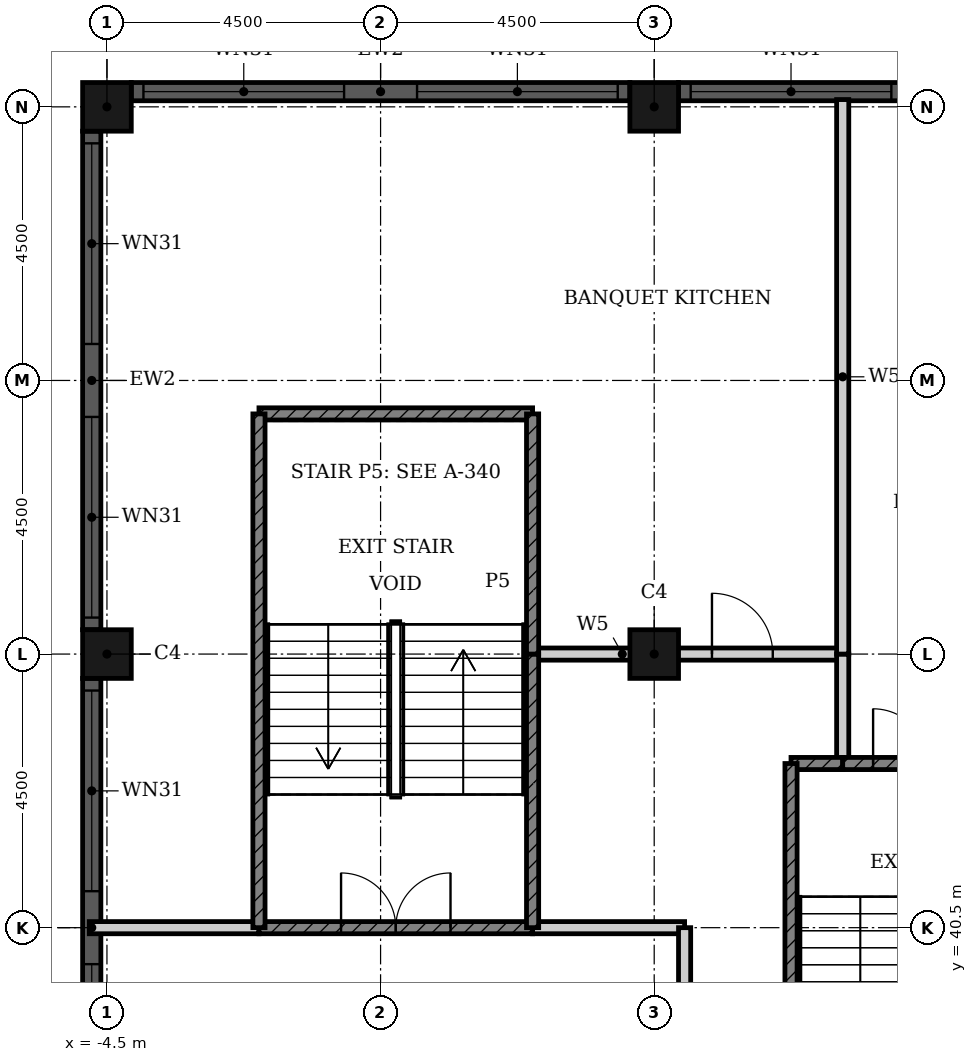
"""IFC4 building model, lengths in metres.
Left out: names, types, materials, properties, quantities, classifications, styles, units other than length and angle.
Written with IfcOpenShell. Run it as: python <this file> out.ifc"""

import sys

from ifc_helpers import new_model, si_unit, direction, frame, frame_2d, origin, origin_2d, place, context, subcontext, project, spatial, rectangle, hollow_rectangle, extrude, element, fill, save


model = new_model("IFC4")
c1 = context("Model", 3, precision=1e-05, world=origin(), true_north=direction((0.0, 1.0)))
c2 = subcontext(c1, "Body", "Model", "MODEL_VIEW")
j1 = project(units=[si_unit("LENGTHUNIT", "METRE"), si_unit("PLANEANGLEUNIT", "RADIAN")], contexts=[c1])
p1 = place(None, origin())
s1 = spatial("IfcSite", under=j1, at=p1, CompositionType="ELEMENT")
p2 = place(p1, origin())
s2 = spatial("IfcBuilding", under=s1, at=p2, CompositionType="ELEMENT")
p3 = place(p2, frame((0.0, 0.0, 17.4)))
s3 = spatial("IfcBuildingStorey", under=s2, at=p3, CompositionType="ELEMENT", Elevation=17.4)
for number, where, z_axis, x_axis in (
    (1, (-4.5, 45.0, 0.0), (0.0, 0.0, 1.0), (1.0, 0.0, 0.0)),
    (2, (-4.5, 54.0, 0.0), (0.0, 0.0, 1.0), (1.0, 0.0, 0.0)),
    (3, (4.5, 54.0, 0.0), (0.0, 0.0, 1.0), (1.0, 0.0, 0.0)),
    (4, (4.5, 45.0, 0.0), (0.0, 0.0, 1.0), (1.0, 0.0, 0.0)),
):
    element("IfcColumn", number, at=place(p3, frame(where, z_axis=z_axis, x_axis=x_axis)), inside=s3, PredefinedType="COLUMN", context=c2, shape_type="SweptSolid", body=[
        extrude(hollow_rectangle(XDim=0.8, YDim=0.8, WallThickness=0.025, at=origin_2d()), origin(), (0.0, 0.0, 1.0), 6.6),
    ])
p4 = place(p3, frame((13.1, 54.25, 0.0), z_axis=(0.0, 0.0, 1.0), x_axis=(-1.0, 0.0, 0.0)))
e5 = element("IfcWall", 5, at=p4, inside=s3, PredefinedType="SOLIDWALL", context=c2, shape_type="SweptSolid", body=[
    extrude(rectangle(XDim=8.2, YDim=0.3, at=frame_2d((4.1, 0.0))), origin(), (0.0, 0.0, 1.0), 6.6),
])
p5 = place(p4, frame((0.2, 0.0, 0.9)))
e6 = element("IfcOpeningElement", 6, at=p5, cuts=e5, PredefinedType="OPENING", context=c2, shape_type="SweptSolid", body=[
    extrude(rectangle(XDim=3.3, YDim=3.6, at=frame_2d((1.65, 1.8))), frame((0.0, 0.16, 0.0), z_axis=(0.0, -1.0, 0.0), x_axis=(1.0, 0.0, 0.0)), (0.0, 0.0, 1.0), 0.32),
])
p6 = place(p4, frame((4.7, 0.0, 0.9)))
e7 = element("IfcOpeningElement", 7, at=p6, cuts=e5, PredefinedType="OPENING", context=c2, shape_type="SweptSolid", body=[
    extrude(rectangle(XDim=3.3, YDim=3.6, at=frame_2d((1.65, 1.8))), frame((0.0, 0.16, 0.0), z_axis=(0.0, -1.0, 0.0), x_axis=(1.0, 0.0, 0.0)), (0.0, 0.0, 1.0), 0.32),
])
p7 = place(p3, frame((4.1, 54.25, 0.0), z_axis=(0.0, 0.0, 1.0), x_axis=(-1.0, 0.0, 0.0)))
e8 = element("IfcWall", 8, at=p7, inside=s3, PredefinedType="SOLIDWALL", context=c2, shape_type="SweptSolid", body=[
    extrude(rectangle(XDim=8.2, YDim=0.3, at=frame_2d((4.1, 0.0))), origin(), (0.0, 0.0, 1.0), 6.6),
])
p8 = place(p7, frame((0.2, 0.0, 0.9)))
e9 = element("IfcOpeningElement", 9, at=p8, cuts=e8, PredefinedType="OPENING", context=c2, shape_type="SweptSolid", body=[
    extrude(rectangle(XDim=3.3, YDim=3.6, at=frame_2d((1.65, 1.8))), frame((0.0, 0.16, 0.0), z_axis=(0.0, -1.0, 0.0), x_axis=(1.0, 0.0, 0.0)), (0.0, 0.0, 1.0), 0.32),
])
p9 = place(p7, frame((4.7, 0.0, 0.9)))
e10 = element("IfcOpeningElement", 10, at=p9, cuts=e8, PredefinedType="OPENING", context=c2, shape_type="SweptSolid", body=[
    extrude(rectangle(XDim=3.3, YDim=3.6, at=frame_2d((1.65, 1.8))), frame((0.0, 0.16, 0.0), z_axis=(0.0, -1.0, 0.0), x_axis=(1.0, 0.0, 0.0)), (0.0, 0.0, 1.0), 0.32),
])
p10 = place(p3, frame((-4.75, 53.6, 0.0), z_axis=(0.0, 0.0, 1.0), x_axis=(0.0, -1.0, 0.0)))
e11 = element("IfcWall", 11, at=p10, inside=s3, PredefinedType="SOLIDWALL", context=c2, shape_type="SweptSolid", body=[
    extrude(rectangle(XDim=8.2, YDim=0.3, at=frame_2d((4.1, 0.0))), origin(), (0.0, 0.0, 1.0), 6.6),
])
p11 = place(p10, frame((0.2, 0.0, 0.9)))
e12 = element("IfcOpeningElement", 12, at=p11, cuts=e11, PredefinedType="OPENING", context=c2, shape_type="SweptSolid", body=[
    extrude(rectangle(XDim=3.3, YDim=3.6, at=frame_2d((1.65, 1.8))), frame((0.0, 0.16, 0.0), z_axis=(0.0, -1.0, 0.0), x_axis=(1.0, 0.0, 0.0)), (0.0, 0.0, 1.0), 0.32),
])
p12 = place(p10, frame((4.7, 0.0, 0.9)))
e13 = element("IfcOpeningElement", 13, at=p12, cuts=e11, PredefinedType="OPENING", context=c2, shape_type="SweptSolid", body=[
    extrude(rectangle(XDim=3.3, YDim=3.6, at=frame_2d((1.65, 1.8))), frame((0.0, 0.16, 0.0), z_axis=(0.0, -1.0, 0.0), x_axis=(1.0, 0.0, 0.0)), (0.0, 0.0, 1.0), 0.32),
])
p13 = place(p3, frame((-4.75, 44.6, 0.0), z_axis=(0.0, 0.0, 1.0), x_axis=(0.0, -1.0, 0.0)))
e14 = element("IfcWall", 14, at=p13, inside=s3, PredefinedType="SOLIDWALL", context=c2, shape_type="SweptSolid", body=[
    extrude(rectangle(XDim=8.2, YDim=0.3, at=frame_2d((4.1, 0.0))), origin(), (0.0, 0.0, 1.0), 6.6),
])
p14 = place(p13, frame((0.2, 0.0, 0.9)))
e15 = element("IfcOpeningElement", 15, at=p14, cuts=e14, PredefinedType="OPENING", context=c2, shape_type="SweptSolid", body=[
    extrude(rectangle(XDim=3.3, YDim=3.6, at=frame_2d((1.65, 1.8))), frame((0.0, 0.16, 0.0), z_axis=(0.0, -1.0, 0.0), x_axis=(1.0, 0.0, 0.0)), (0.0, 0.0, 1.0), 0.32),
])
p15 = place(p13, frame((4.7, 0.0, 0.9)))
e16 = element("IfcOpeningElement", 16, at=p15, cuts=e14, PredefinedType="OPENING", context=c2, shape_type="SweptSolid", body=[
    extrude(rectangle(XDim=3.3, YDim=3.6, at=frame_2d((1.65, 1.8))), frame((0.0, 0.16, 0.0), z_axis=(0.0, -1.0, 0.0), x_axis=(1.0, 0.0, 0.0)), (0.0, 0.0, 1.0), 0.32),
])
p16 = place(p3, frame((2.5, 40.5, 0.0), z_axis=(0.0, 0.0, 1.0), x_axis=(1.0, 0.0, 0.0)))
e17 = element("IfcWall", 17, at=p16, inside=s3, PredefinedType="PARTITIONING", context=c2, shape_type="SweptSolid", body=[
    extrude(rectangle(XDim=2.5, YDim=0.2, at=frame_2d((1.25, 0.0))), origin(), (0.0, 0.0, 1.0), 6.25),
])
p17 = place(p3, frame((-4.79, 40.5, 0.0), z_axis=(0.0, 0.0, 1.0), x_axis=(1.0, 0.0, 0.0)))
e18 = element("IfcWall", 18, at=p17, inside=s3, PredefinedType="PARTITIONING", context=c2, shape_type="SweptSolid", body=[
    extrude(rectangle(XDim=2.79, YDim=0.2, at=frame_2d((1.395, 0.0))), origin(), (0.0, 0.0, 1.0), 6.25),
])
p18 = place(p3, frame((2.5, 45.0, 0.0), z_axis=(0.0, 0.0, 1.0), x_axis=(1.0, 0.0, 0.0)))
e19 = element("IfcWall", 19, at=p18, inside=s3, PredefinedType="PARTITIONING", context=c2, shape_type="SweptSolid", body=[
    extrude(rectangle(XDim=5.1, YDim=0.2, at=frame_2d((2.55, 0.0))), origin(), (0.0, 0.0, 1.0), 6.25),
])
p19 = place(p18, frame((2.95, 0.0, 0.0)))
e20 = element("IfcOpeningElement", 20, at=p19, cuts=e19, PredefinedType="OPENING", context=c2, shape_type="SweptSolid", body=[
    extrude(rectangle(XDim=1.0, YDim=2.1, at=frame_2d((0.5, 1.05))), frame((0.0, 0.11, 0.0), z_axis=(0.0, -1.0, 0.0), x_axis=(1.0, 0.0, 0.0)), (0.0, 0.0, 1.0), 0.22),
])
p20 = place(p3, frame((5.0, 37.5, 0.0), z_axis=(0.0, 0.0, 1.0), x_axis=(0.0, 1.0, 0.0)))
e21 = element("IfcWall", 21, at=p20, inside=s3, PredefinedType="PARTITIONING", context=c2, shape_type="SweptSolid", body=[
    extrude(rectangle(XDim=3.0, YDim=0.2, at=frame_2d((1.5, 0.0))), origin(), (0.0, 0.0, 1.0), 6.25),
])
p21 = place(p3, frame((7.6, 43.2, 0.0), z_axis=(0.0, 0.0, 1.0), x_axis=(0.0, 1.0, 0.0)))
e22 = element("IfcWall", 22, at=p21, inside=s3, PredefinedType="PARTITIONING", context=c2, shape_type="SweptSolid", body=[
    extrude(rectangle(XDim=1.8, YDim=0.2, at=frame_2d((0.9, 0.0))), origin(), (0.0, 0.0, 1.0), 6.25),
])
p22 = place(p3, frame((7.6, 45.0, 0.0), z_axis=(0.0, 0.0, 1.0), x_axis=(0.0, 1.0, 0.0)))
e23 = element("IfcWall", 23, at=p22, inside=s3, PredefinedType="PARTITIONING", context=c2, shape_type="SweptSolid", body=[
    extrude(rectangle(XDim=9.12, YDim=0.2, at=frame_2d((4.56, 0.0))), origin(), (0.0, 0.0, 1.0), 6.25),
])
p23 = place(p3, frame((-2.0, 40.5, 0.0), z_axis=(0.0, 0.0, 1.0), x_axis=(1.0, 0.0, 0.0)))
e24 = element("IfcWall", 24, at=p23, inside=s3, PredefinedType="SHEAR", context=c2, shape_type="SweptSolid", body=[
    extrude(rectangle(XDim=4.5, YDim=0.2, at=frame_2d((2.25, 0.0))), origin(), (0.0, 0.0, 1.0), 6.25),
])
p24 = place(p23, frame((1.35, 0.0, 0.0)))
e25 = element("IfcOpeningElement", 25, at=p24, cuts=e24, PredefinedType="OPENING", context=c2, shape_type="SweptSolid", body=[
    extrude(rectangle(XDim=1.8, YDim=2.1, at=frame_2d((0.9, 1.05))), frame((0.0, 0.11, 0.0), z_axis=(0.0, -1.0, 0.0), x_axis=(1.0, 0.0, 0.0)), (0.0, 0.0, 1.0), 0.22),
])
p25 = place(p3, frame((6.75, 43.2, 0.0), z_axis=(0.0, 0.0, 1.0), x_axis=(1.0, 0.0, 0.0)))
e26 = element("IfcWall", 26, at=p25, inside=s3, PredefinedType="SHEAR", context=c2, shape_type="SweptSolid", body=[
    extrude(rectangle(XDim=0.85, YDim=0.2, at=frame_2d((0.425, 0.0))), origin(), (0.0, 0.0, 1.0), 6.25),
])
p26 = place(p3, frame((7.6, 43.2, 0.0), z_axis=(0.0, 0.0, 1.0), x_axis=(1.0, 0.0, 0.0)))
e27 = element("IfcWall", 27, at=p26, inside=s3, PredefinedType="SHEAR", context=c2, shape_type="SweptSolid", body=[
    extrude(rectangle(XDim=2.8, YDim=0.2, at=frame_2d((1.4, 0.0))), origin(), (0.0, 0.0, 1.0), 6.25),
])
p27 = place(p26, frame((0.5, 0.0, 0.0)))
e28 = element("IfcOpeningElement", 28, at=p27, cuts=e27, PredefinedType="OPENING", context=c2, shape_type="SweptSolid", body=[
    extrude(rectangle(XDim=1.8, YDim=2.1, at=frame_2d((0.9, 1.05))), frame((0.0, 0.11, 0.0), z_axis=(0.0, -1.0, 0.0), x_axis=(1.0, 0.0, 0.0)), (0.0, 0.0, 1.0), 0.22),
])
p28 = place(p3, frame((-2.0, 48.95, 0.0), z_axis=(0.0, 0.0, 1.0), x_axis=(1.0, 0.0, 0.0)))
e29 = element("IfcWall", 29, at=p28, inside=s3, PredefinedType="SHEAR", context=c2, shape_type="SweptSolid", body=[
    extrude(rectangle(XDim=4.5, YDim=0.2, at=frame_2d((2.25, 0.0))), origin(), (0.0, 0.0, 1.0), 6.25),
])
p29 = place(p3, frame((-2.0, 40.5, 0.0), z_axis=(0.0, 0.0, 1.0), x_axis=(0.0, 1.0, 0.0)))
e30 = element("IfcWall", 30, at=p29, inside=s3, PredefinedType="SHEAR", context=c2, shape_type="SweptSolid", body=[
    extrude(rectangle(XDim=8.45, YDim=0.2, at=frame_2d((4.225, 0.0))), origin(), (0.0, 0.0, 1.0), 6.25),
])
p30 = place(p3, frame((2.5, 40.5, 0.0), z_axis=(0.0, 0.0, 1.0), x_axis=(0.0, 1.0, 0.0)))
e31 = element("IfcWall", 31, at=p30, inside=s3, PredefinedType="SHEAR", context=c2, shape_type="SweptSolid", body=[
    extrude(rectangle(XDim=4.5, YDim=0.2, at=frame_2d((2.25, 0.0))), origin(), (0.0, 0.0, 1.0), 6.25),
])
p31 = place(p3, frame((2.5, 45.0, 0.0), z_axis=(0.0, 0.0, 1.0), x_axis=(0.0, 1.0, 0.0)))
e32 = element("IfcWall", 32, at=p31, inside=s3, PredefinedType="SHEAR", context=c2, shape_type="SweptSolid", body=[
    extrude(rectangle(XDim=3.95, YDim=0.2, at=frame_2d((1.975, 0.0))), origin(), (0.0, 0.0, 1.0), 6.25),
])
p32 = place(p3, frame((6.75, 34.75, 0.0), z_axis=(0.0, 0.0, 1.0), x_axis=(0.0, 1.0, 0.0)))
e33 = element("IfcWall", 33, at=p32, inside=s3, PredefinedType="SHEAR", context=c2, shape_type="SweptSolid", body=[
    extrude(rectangle(XDim=8.45, YDim=0.2, at=frame_2d((4.225, 0.0))), origin(), (0.0, 0.0, 1.0), 6.25),
])
p33 = place(p6, origin())
e34 = element("IfcWindow", 34, at=p33, inside=s3, PartitioningType="SINGLE_PANEL", PredefinedType="WINDOW", context=c2, shape_type="SweptSolid", body=[
    extrude(rectangle(XDim=3.3, YDim=3.6, at=frame_2d((1.65, 1.8))), frame((0.0, 0.03, 0.0), z_axis=(0.0, -1.0, 0.0), x_axis=(1.0, 0.0, 0.0)), (0.0, 0.0, 1.0), 0.06),
])
fill(e7, e34)
p34 = place(p8, origin())
e35 = element("IfcWindow", 35, at=p34, inside=s3, PartitioningType="SINGLE_PANEL", PredefinedType="WINDOW", context=c2, shape_type="SweptSolid", body=[
    extrude(rectangle(XDim=3.3, YDim=3.6, at=frame_2d((1.65, 1.8))), frame((0.0, 0.03, 0.0), z_axis=(0.0, -1.0, 0.0), x_axis=(1.0, 0.0, 0.0)), (0.0, 0.0, 1.0), 0.06),
])
fill(e9, e35)
p35 = place(p9, origin())
e36 = element("IfcWindow", 36, at=p35, inside=s3, PartitioningType="SINGLE_PANEL", PredefinedType="WINDOW", context=c2, shape_type="SweptSolid", body=[
    extrude(rectangle(XDim=3.3, YDim=3.6, at=frame_2d((1.65, 1.8))), frame((0.0, 0.03, 0.0), z_axis=(0.0, -1.0, 0.0), x_axis=(1.0, 0.0, 0.0)), (0.0, 0.0, 1.0), 0.06),
])
fill(e10, e36)
p36 = place(p11, origin())
e37 = element("IfcWindow", 37, at=p36, inside=s3, PartitioningType="SINGLE_PANEL", PredefinedType="WINDOW", context=c2, shape_type="SweptSolid", body=[
    extrude(rectangle(XDim=3.3, YDim=3.6, at=frame_2d((1.65, 1.8))), frame((0.0, 0.03, 0.0), z_axis=(0.0, -1.0, 0.0), x_axis=(1.0, 0.0, 0.0)), (0.0, 0.0, 1.0), 0.06),
])
fill(e12, e37)
p37 = place(p12, origin())
e38 = element("IfcWindow", 38, at=p37, inside=s3, PartitioningType="SINGLE_PANEL", PredefinedType="WINDOW", context=c2, shape_type="SweptSolid", body=[
    extrude(rectangle(XDim=3.3, YDim=3.6, at=frame_2d((1.65, 1.8))), frame((0.0, 0.03, 0.0), z_axis=(0.0, -1.0, 0.0), x_axis=(1.0, 0.0, 0.0)), (0.0, 0.0, 1.0), 0.06),
])
fill(e13, e38)
p38 = place(p14, origin())
e39 = element("IfcWindow", 39, at=p38, inside=s3, PartitioningType="SINGLE_PANEL", PredefinedType="WINDOW", context=c2, shape_type="SweptSolid", body=[
    extrude(rectangle(XDim=3.3, YDim=3.6, at=frame_2d((1.65, 1.8))), frame((0.0, 0.03, 0.0), z_axis=(0.0, -1.0, 0.0), x_axis=(1.0, 0.0, 0.0)), (0.0, 0.0, 1.0), 0.06),
])
fill(e15, e39)
p39 = place(p15, origin())
e40 = element("IfcWindow", 40, at=p39, inside=s3, PartitioningType="SINGLE_PANEL", PredefinedType="WINDOW", context=c2, shape_type="SweptSolid", body=[
    extrude(rectangle(XDim=3.3, YDim=3.6, at=frame_2d((1.65, 1.8))), frame((0.0, 0.03, 0.0), z_axis=(0.0, -1.0, 0.0), x_axis=(1.0, 0.0, 0.0)), (0.0, 0.0, 1.0), 0.06),
])
fill(e16, e40)
p40 = place(p27, origin())
e41 = element("IfcDoor", 41, at=p40, inside=s3, OperationType="DOUBLE_DOOR_SINGLE_SWING", PredefinedType="DOOR", context=c2, shape_type="SweptSolid", body=[
    extrude(rectangle(XDim=1.8, YDim=2.1, at=frame_2d((0.9, 1.05))), frame((0.0, 0.025, 0.0), z_axis=(0.0, -1.0, 0.0), x_axis=(1.0, 0.0, 0.0)), (0.0, 0.0, 1.0), 0.05),
])
fill(e28, e41)
p41 = place(p24, origin())
e42 = element("IfcDoor", 42, at=p41, inside=s3, OperationType="DOUBLE_DOOR_SINGLE_SWING", PredefinedType="DOOR", context=c2, shape_type="SweptSolid", body=[
    extrude(rectangle(XDim=1.8, YDim=2.1, at=frame_2d((0.9, 1.05))), frame((0.0, 0.025, 0.0), z_axis=(0.0, -1.0, 0.0), x_axis=(1.0, 0.0, 0.0)), (0.0, 0.0, 1.0), 0.05),
])
fill(e25, e42)
p42 = place(p19, origin())
e43 = element("IfcDoor", 43, at=p42, inside=s3, OperationType="SINGLE_SWING_RIGHT", PredefinedType="DOOR", context=c2, shape_type="SweptSolid", body=[
    extrude(rectangle(XDim=1.0, YDim=2.1, at=frame_2d((0.5, 1.05))), frame((0.0, 0.025, 0.0), z_axis=(0.0, -1.0, 0.0), x_axis=(1.0, 0.0, 0.0)), (0.0, 0.0, 1.0), 0.05),
])
fill(e20, e43)
save(model, sys.argv[1])
